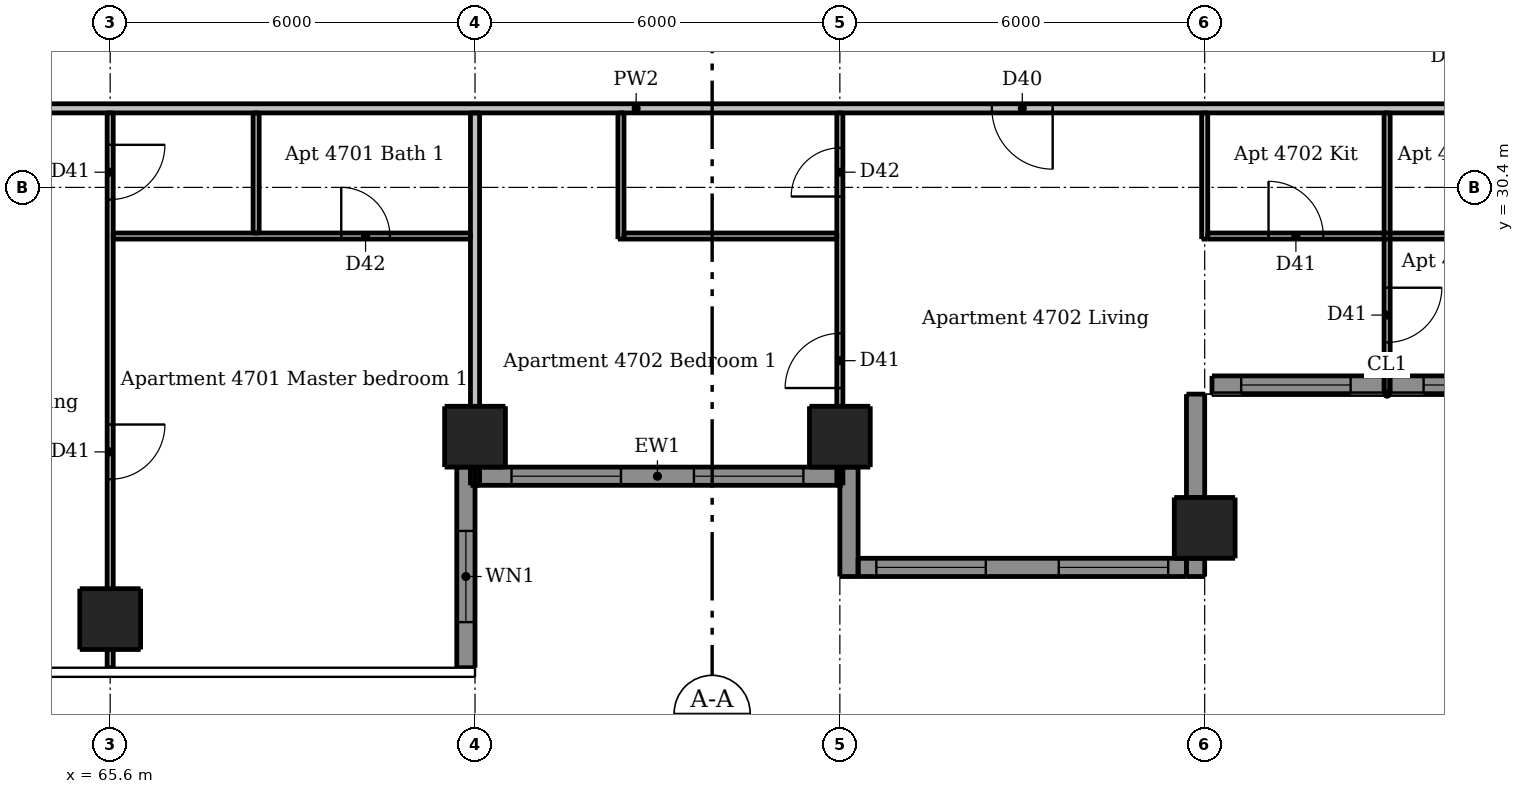
"""IFC4 building model, lengths in metres.
Left out: names, types, materials, properties, quantities, classifications, styles, units other than length and angle.
Written with IfcOpenShell. Run it as: python <this file> out.ifc"""

import sys

from ifc_helpers import new_model, si_unit, direction, frame, frame_2d, origin, origin_2d, place, context, subcontext, project, spatial, rectangle, extrude, element, fill, save


model = new_model("IFC4")
c1 = context("Model", 3, precision=1e-05, world=origin(), true_north=direction((0.0, 1.0)))
c2 = subcontext(c1, "Body", "Model", "MODEL_VIEW")
j1 = project(units=[si_unit("LENGTHUNIT", "METRE"), si_unit("PLANEANGLEUNIT", "RADIAN")], contexts=[c1])
p1 = place(None, origin())
s1 = spatial("IfcSite", under=j1, at=p1, CompositionType="ELEMENT")
p2 = place(p1, origin())
s2 = spatial("IfcBuilding", under=s1, at=p2, CompositionType="ELEMENT")
p3 = place(p2, frame((0.0, 0.0, 174.7)))
s3 = spatial("IfcBuildingStorey", under=s2, at=p3, CompositionType="ELEMENT", Elevation=174.7)
for number, where, z_axis, x_axis in (
    (1, (65.6, 23.3, 0.0), (0.0, 0.0, 1.0), (1.0, 0.0, 0.0)),
    (2, (71.6, 26.3, 0.0), (0.0, 0.0, 1.0), (1.0, 0.0, 0.0)),
    (3, (77.6, 26.3, 0.0), (0.0, 0.0, 1.0), (1.0, 0.0, 0.0)),
    (4, (83.6, 24.8, 0.0), (0.0, 0.0, 1.0), (1.0, 0.0, 0.0)),
):
    element("IfcColumn", number, at=place(p3, frame(where, z_axis=z_axis, x_axis=x_axis)), inside=s3, PredefinedType="COLUMN", context=c2, shape_type="SweptSolid", body=[
        extrude(rectangle(XDim=1.0, YDim=1.0, at=origin_2d()), origin(), (0.0, 0.0, 1.0), 2.95),
    ])
p4 = place(p3, frame((71.45, 22.5, 0.0), z_axis=(0.0, 0.0, 1.0), x_axis=(0.0, 1.0, 0.0)))
e5 = element("IfcWall", 5, at=p4, inside=s3, PredefinedType="SOLIDWALL", context=c2, shape_type="SweptSolid", body=[
    extrude(rectangle(XDim=3.3, YDim=0.3, at=frame_2d((1.65, 0.0))), origin(), (0.0, 0.0, 1.0), 2.95),
])
p5 = place(p4, frame((0.75, 0.0, 0.9)))
e6 = element("IfcOpeningElement", 6, at=p5, cuts=e5, PredefinedType="OPENING", context=c2, shape_type="SweptSolid", body=[
    extrude(rectangle(XDim=1.5, YDim=1.5, at=frame_2d((0.75, 0.75))), frame((0.0, 0.16, 0.0), z_axis=(0.0, -1.0, 0.0), x_axis=(1.0, 0.0, 0.0)), (0.0, 0.0, 1.0), 0.32),
])
p6 = place(p3, frame((77.75, 25.8, 0.0), z_axis=(0.0, 0.0, 1.0), x_axis=(0.0, -1.0, 0.0)))
e7 = element("IfcWall", 7, at=p6, inside=s3, PredefinedType="SOLIDWALL", context=c2, shape_type="SweptSolid", body=[
    extrude(rectangle(XDim=1.8, YDim=0.3, at=frame_2d((0.9, 0.0))), origin(), (0.0, 0.0, 1.0), 2.95),
])
p7 = place(p3, frame((83.45, 24.0, 0.0), z_axis=(0.0, 0.0, 1.0), x_axis=(0.0, 1.0, 0.0)))
e8 = element("IfcWall", 8, at=p7, inside=s3, PredefinedType="SOLIDWALL", context=c2, shape_type="SweptSolid", body=[
    extrude(rectangle(XDim=0.3, YDim=0.3, at=frame_2d((0.15, 0.0))), origin(), (0.0, 0.0, 1.0), 2.95),
])
p8 = place(p3, frame((83.45, 25.3, 0.0), z_axis=(0.0, 0.0, 1.0), x_axis=(0.0, 1.0, 0.0)))
e9 = element("IfcWall", 9, at=p8, inside=s3, PredefinedType="SOLIDWALL", context=c2, shape_type="SweptSolid", body=[
    extrude(rectangle(XDim=1.7, YDim=0.3, at=frame_2d((0.85, 0.0))), origin(), (0.0, 0.0, 1.0), 2.95),
])
p9 = place(p3, frame((71.6, 25.65, 0.0), z_axis=(0.0, 0.0, 1.0), x_axis=(1.0, 0.0, 0.0)))
e10 = element("IfcWall", 10, at=p9, inside=s3, PredefinedType="SOLIDWALL", context=c2, shape_type="SweptSolid", body=[
    extrude(rectangle(XDim=6.0, YDim=0.3, at=frame_2d((3.0, 0.0))), origin(), (0.0, 0.0, 1.0), 2.95),
])
p10 = place(p9, frame((0.6, 0.0, 0.15)))
e11 = element("IfcOpeningElement", 11, at=p10, cuts=e10, PredefinedType="OPENING", context=c2, shape_type="SweptSolid", body=[
    extrude(rectangle(XDim=1.8, YDim=2.1, at=frame_2d((0.9, 1.05))), frame((0.0, 0.16, 0.0), z_axis=(0.0, -1.0, 0.0), x_axis=(1.0, 0.0, 0.0)), (0.0, 0.0, 1.0), 0.32),
])
p11 = place(p9, frame((3.6, 0.0, 0.15)))
e12 = element("IfcOpeningElement", 12, at=p11, cuts=e10, PredefinedType="OPENING", context=c2, shape_type="SweptSolid", body=[
    extrude(rectangle(XDim=1.8, YDim=2.1, at=frame_2d((0.9, 1.05))), frame((0.0, 0.16, 0.0), z_axis=(0.0, -1.0, 0.0), x_axis=(1.0, 0.0, 0.0)), (0.0, 0.0, 1.0), 0.32),
])
p12 = place(p3, frame((77.9, 24.15, 0.0), z_axis=(0.0, 0.0, 1.0), x_axis=(1.0, 0.0, 0.0)))
e13 = element("IfcWall", 13, at=p12, inside=s3, PredefinedType="SOLIDWALL", context=c2, shape_type="SweptSolid", body=[
    extrude(rectangle(XDim=5.4, YDim=0.3, at=frame_2d((2.7, 0.0))), origin(), (0.0, 0.0, 1.0), 2.34),
])
p13 = place(p12, frame((0.3, 0.0, 0.15)))
e14 = element("IfcOpeningElement", 14, at=p13, cuts=e13, PredefinedType="OPENING", context=c2, shape_type="SweptSolid", body=[
    extrude(rectangle(XDim=1.8, YDim=2.1, at=frame_2d((0.9, 1.05))), frame((0.0, 0.16, 0.0), z_axis=(0.0, -1.0, 0.0), x_axis=(1.0, 0.0, 0.0)), (0.0, 0.0, 1.0), 0.32),
])
p14 = place(p12, frame((3.3, 0.0, 0.15)))
e15 = element("IfcOpeningElement", 15, at=p14, cuts=e13, PredefinedType="OPENING", context=c2, shape_type="SweptSolid", body=[
    extrude(rectangle(XDim=1.8, YDim=2.1, at=frame_2d((0.9, 1.05))), frame((0.0, 0.16, 0.0), z_axis=(0.0, -1.0, 0.0), x_axis=(1.0, 0.0, 0.0)), (0.0, 0.0, 1.0), 0.32),
])
p15 = place(p3, frame((83.72, 27.15, 0.0), z_axis=(0.0, 0.0, 1.0), x_axis=(1.0, 0.0, 0.0)))
e16 = element("IfcWall", 16, at=p15, inside=s3, PredefinedType="SOLIDWALL", context=c2, shape_type="SweptSolid", body=[
    extrude(rectangle(XDim=5.76, YDim=0.3, at=frame_2d((2.88, 0.0))), origin(), (0.0, 0.0, 1.0), 2.95),
])
p16 = place(p15, frame((0.48, 0.0, 0.15)))
e17 = element("IfcOpeningElement", 17, at=p16, cuts=e16, PredefinedType="OPENING", context=c2, shape_type="SweptSolid", body=[
    extrude(rectangle(XDim=1.8, YDim=2.1, at=frame_2d((0.9, 1.05))), frame((0.0, 0.16, 0.0), z_axis=(0.0, -1.0, 0.0), x_axis=(1.0, 0.0, 0.0)), (0.0, 0.0, 1.0), 0.32),
])
p17 = place(p15, frame((3.48, 0.0, 0.15)))
e18 = element("IfcOpeningElement", 18, at=p17, cuts=e16, PredefinedType="OPENING", context=c2, shape_type="SweptSolid", body=[
    extrude(rectangle(XDim=1.8, YDim=2.1, at=frame_2d((0.9, 1.05))), frame((0.0, 0.16, 0.0), z_axis=(0.0, -1.0, 0.0), x_axis=(1.0, 0.0, 0.0)), (0.0, 0.0, 1.0), 0.32),
])
p18 = place(p3, frame((65.6, 31.625, 0.0), z_axis=(0.0, 0.0, 1.0), x_axis=(0.0, -1.0, 0.0)))
e19 = element("IfcWall", 19, at=p18, inside=s3, PredefinedType="PARTITIONING", context=c2, shape_type="SweptSolid", body=[
    extrude(rectangle(XDim=9.125, YDim=0.1, at=frame_2d((4.562, 0.0))), origin(), (0.0, 0.0, 1.0), 2.332),
])
p19 = place(p18, frame((0.525, 0.0, 0.0)))
e20 = element("IfcOpeningElement", 20, at=p19, cuts=e19, PredefinedType="OPENING", context=c2, shape_type="SweptSolid", body=[
    extrude(rectangle(XDim=0.9, YDim=2.1, at=frame_2d((0.45, 1.05))), frame((0.0, 0.06, 0.0), z_axis=(0.0, -1.0, 0.0), x_axis=(1.0, 0.0, 0.0)), (0.0, 0.0, 1.0), 0.12),
])
p20 = place(p18, frame((5.125, 0.0, 0.0)))
e21 = element("IfcOpeningElement", 21, at=p20, cuts=e19, PredefinedType="OPENING", context=c2, shape_type="SweptSolid", body=[
    extrude(rectangle(XDim=0.9, YDim=2.1, at=frame_2d((0.45, 1.05))), frame((0.0, 0.06, 0.0), z_axis=(0.0, -1.0, 0.0), x_axis=(1.0, 0.0, 0.0)), (0.0, 0.0, 1.0), 0.12),
])
p21 = place(p3, frame((68.0, 29.65, 0.0), z_axis=(0.0, 0.0, 1.0), x_axis=(0.0, 1.0, 0.0)))
e22 = element("IfcWall", 22, at=p21, inside=s3, PredefinedType="PARTITIONING", context=c2, shape_type="SweptSolid", body=[
    extrude(rectangle(XDim=1.975, YDim=0.1, at=frame_2d((0.988, 0.0))), origin(), (0.0, 0.0, 1.0), 2.95),
])
p22 = place(p3, frame((74.0, 29.55, 0.0), z_axis=(0.0, 0.0, 1.0), x_axis=(0.0, 1.0, 0.0)))
e23 = element("IfcWall", 23, at=p22, inside=s3, PredefinedType="PARTITIONING", context=c2, shape_type="SweptSolid", body=[
    extrude(rectangle(XDim=2.075, YDim=0.1, at=frame_2d((1.038, 0.0))), origin(), (0.0, 0.0, 1.0), 2.95),
])
p23 = place(p3, frame((77.6, 25.5, 0.0), z_axis=(0.0, 0.0, 1.0), x_axis=(0.0, 1.0, 0.0)))
e24 = element("IfcWall", 24, at=p23, inside=s3, PredefinedType="PARTITIONING", context=c2, shape_type="SweptSolid", body=[
    extrude(rectangle(XDim=6.125, YDim=0.1, at=frame_2d((3.062, 0.0))), origin(), (0.0, 0.0, 1.0), 2.332),
])
p24 = place(p23, frame((1.6, 0.0, 0.0)))
e25 = element("IfcOpeningElement", 25, at=p24, cuts=e24, PredefinedType="OPENING", context=c2, shape_type="SweptSolid", body=[
    extrude(rectangle(XDim=0.9, YDim=2.1, at=frame_2d((0.45, 1.05))), frame((0.0, 0.06, 0.0), z_axis=(0.0, -1.0, 0.0), x_axis=(1.0, 0.0, 0.0)), (0.0, 0.0, 1.0), 0.12),
])
p25 = place(p23, frame((4.75, 0.0, 0.0)))
e26 = element("IfcOpeningElement", 26, at=p25, cuts=e24, PredefinedType="OPENING", context=c2, shape_type="SweptSolid", body=[
    extrude(rectangle(XDim=0.8, YDim=2.1, at=frame_2d((0.4, 1.05))), frame((0.0, 0.06, 0.0), z_axis=(0.0, -1.0, 0.0), x_axis=(1.0, 0.0, 0.0)), (0.0, 0.0, 1.0), 0.12),
])
p26 = place(p3, frame((83.6, 29.55, 0.0), z_axis=(0.0, 0.0, 1.0), x_axis=(0.0, 1.0, 0.0)))
e27 = element("IfcWall", 27, at=p26, inside=s3, PredefinedType="PARTITIONING", context=c2, shape_type="SweptSolid", body=[
    extrude(rectangle(XDim=2.075, YDim=0.1, at=frame_2d((1.038, 0.0))), origin(), (0.0, 0.0, 1.0), 2.332),
])
p27 = place(p3, frame((86.6, 31.625, 0.0), z_axis=(0.0, 0.0, 1.0), x_axis=(0.0, -1.0, 0.0)))
e28 = element("IfcWall", 28, at=p27, inside=s3, PredefinedType="PARTITIONING", context=c2, shape_type="SweptSolid", body=[
    extrude(rectangle(XDim=4.625, YDim=0.1, at=frame_2d((2.312, 0.0))), origin(), (0.0, 0.0, 1.0), 2.95),
])
p28 = place(p27, frame((2.875, 0.0, 0.0)))
e29 = element("IfcOpeningElement", 29, at=p28, cuts=e28, PredefinedType="OPENING", context=c2, shape_type="SweptSolid", body=[
    extrude(rectangle(XDim=0.9, YDim=2.1, at=frame_2d((0.45, 1.05))), frame((0.0, 0.06, 0.0), z_axis=(0.0, -1.0, 0.0), x_axis=(1.0, 0.0, 0.0)), (0.0, 0.0, 1.0), 0.12),
])
p29 = place(p3, frame((65.65, 29.6, 0.0), z_axis=(0.0, 0.0, 1.0), x_axis=(1.0, 0.0, 0.0)))
e30 = element("IfcWall", 30, at=p29, inside=s3, PredefinedType="PARTITIONING", context=c2, shape_type="SweptSolid", body=[
    extrude(rectangle(XDim=5.875, YDim=0.1, at=frame_2d((2.938, 0.0))), origin(), (0.0, 0.0, 1.0), 2.95),
])
p30 = place(p29, frame((3.75, 0.0, 0.0)))
e31 = element("IfcOpeningElement", 31, at=p30, cuts=e30, PredefinedType="OPENING", context=c2, shape_type="SweptSolid", body=[
    extrude(rectangle(XDim=0.8, YDim=2.1, at=frame_2d((0.4, 1.05))), frame((0.0, 0.06, 0.0), z_axis=(0.0, -1.0, 0.0), x_axis=(1.0, 0.0, 0.0)), (0.0, 0.0, 1.0), 0.12),
])
p31 = place(p3, frame((74.05, 29.6, 0.0), z_axis=(0.0, 0.0, 1.0), x_axis=(1.0, 0.0, 0.0)))
e32 = element("IfcWall", 32, at=p31, inside=s3, PredefinedType="PARTITIONING", context=c2, shape_type="SweptSolid", body=[
    extrude(rectangle(XDim=3.5, YDim=0.1, at=frame_2d((1.75, 0.0))), origin(), (0.0, 0.0, 1.0), 2.95),
])
p32 = place(p3, frame((83.65, 29.6, 0.0), z_axis=(0.0, 0.0, 1.0), x_axis=(1.0, 0.0, 0.0)))
e33 = element("IfcWall", 33, at=p32, inside=s3, PredefinedType="PARTITIONING", context=c2, shape_type="SweptSolid", body=[
    extrude(rectangle(XDim=5.875, YDim=0.1, at=frame_2d((2.938, 0.0))), origin(), (0.0, 0.0, 1.0), 2.95),
])
p33 = place(p32, frame((1.0, 0.0, 0.0)))
e34 = element("IfcOpeningElement", 34, at=p33, cuts=e33, PredefinedType="OPENING", context=c2, shape_type="SweptSolid", body=[
    extrude(rectangle(XDim=0.9, YDim=2.1, at=frame_2d((0.45, 1.05))), frame((0.0, 0.06, 0.0), z_axis=(0.0, -1.0, 0.0), x_axis=(1.0, 0.0, 0.0)), (0.0, 0.0, 1.0), 0.12),
])
p34 = place(p32, frame((4.05, 0.0, 0.0)))
e35 = element("IfcOpeningElement", 35, at=p34, cuts=e33, PredefinedType="OPENING", context=c2, shape_type="SweptSolid", body=[
    extrude(rectangle(XDim=0.8, YDim=2.1, at=frame_2d((0.4, 1.05))), frame((0.0, 0.06, 0.0), z_axis=(0.0, -1.0, 0.0), x_axis=(1.0, 0.0, 0.0)), (0.0, 0.0, 1.0), 0.12),
])
p35 = place(p3, frame((71.6, 25.5, 0.0), z_axis=(0.0, 0.0, 1.0), x_axis=(0.0, 1.0, 0.0)))
e36 = element("IfcWall", 36, at=p35, inside=s3, PredefinedType="PARTITIONING", context=c2, shape_type="SweptSolid", body=[
    extrude(rectangle(XDim=6.125, YDim=0.15, at=frame_2d((3.062, 0.0))), origin(), (0.0, 0.0, 1.0), 2.332),
])
p36 = place(p3, frame((89.525, 31.7, 0.0), z_axis=(0.0, 0.0, 1.0), x_axis=(-1.0, 0.0, 0.0)))
e37 = element("IfcWall", 37, at=p36, inside=s3, PredefinedType="PARTITIONING", context=c2, shape_type="SweptSolid", body=[
    extrude(rectangle(XDim=30.55, YDim=0.15, at=frame_2d((15.275, 0.0))), origin(), (0.0, 0.0, 1.0), 2.95),
])
p37 = place(p36, frame((26.775, 0.0, 0.0)))
e38 = element("IfcOpeningElement", 38, at=p37, cuts=e37, PredefinedType="OPENING", context=c2, shape_type="SweptSolid", body=[
    extrude(rectangle(XDim=1.0, YDim=2.1, at=frame_2d((0.5, 1.05))), frame((0.0, 0.085, 0.0), z_axis=(0.0, -1.0, 0.0), x_axis=(1.0, 0.0, 0.0)), (0.0, 0.0, 1.0), 0.17),
])
p38 = place(p36, frame((8.425, 0.0, 0.0)))
e39 = element("IfcOpeningElement", 39, at=p38, cuts=e37, PredefinedType="OPENING", context=c2, shape_type="SweptSolid", body=[
    extrude(rectangle(XDim=1.0, YDim=2.1, at=frame_2d((0.5, 1.05))), frame((0.0, 0.085, 0.0), z_axis=(0.0, -1.0, 0.0), x_axis=(1.0, 0.0, 0.0)), (0.0, 0.0, 1.0), 0.17),
])
p39 = place(p5, origin())
e40 = element("IfcWindow", 40, at=p39, inside=s3, PartitioningType="DOUBLE_PANEL_VERTICAL", PredefinedType="WINDOW", context=c2, shape_type="SweptSolid", body=[
    extrude(rectangle(XDim=1.5, YDim=1.5, at=frame_2d((0.75, 0.75))), frame((0.0, 0.03, 0.0), z_axis=(0.0, -1.0, 0.0), x_axis=(1.0, 0.0, 0.0)), (0.0, 0.0, 1.0), 0.06),
])
fill(e6, e40)
p40 = place(p10, origin())
e41 = element("IfcWindow", 41, at=p40, inside=s3, PartitioningType="DOUBLE_PANEL_VERTICAL", PredefinedType="WINDOW", context=c2, shape_type="SweptSolid", body=[
    extrude(rectangle(XDim=1.8, YDim=2.1, at=frame_2d((0.9, 1.05))), frame((0.0, 0.03, 0.0), z_axis=(0.0, -1.0, 0.0), x_axis=(1.0, 0.0, 0.0)), (0.0, 0.0, 1.0), 0.06),
])
fill(e11, e41)
p41 = place(p11, origin())
e42 = element("IfcWindow", 42, at=p41, inside=s3, PartitioningType="DOUBLE_PANEL_VERTICAL", PredefinedType="WINDOW", context=c2, shape_type="SweptSolid", body=[
    extrude(rectangle(XDim=1.8, YDim=2.1, at=frame_2d((0.9, 1.05))), frame((0.0, 0.03, 0.0), z_axis=(0.0, -1.0, 0.0), x_axis=(1.0, 0.0, 0.0)), (0.0, 0.0, 1.0), 0.06),
])
fill(e12, e42)
p42 = place(p13, origin())
e43 = element("IfcWindow", 43, at=p42, inside=s3, PartitioningType="DOUBLE_PANEL_VERTICAL", PredefinedType="WINDOW", context=c2, shape_type="SweptSolid", body=[
    extrude(rectangle(XDim=1.8, YDim=2.1, at=frame_2d((0.9, 1.05))), frame((0.0, 0.03, 0.0), z_axis=(0.0, -1.0, 0.0), x_axis=(1.0, 0.0, 0.0)), (0.0, 0.0, 1.0), 0.06),
])
fill(e14, e43)
p43 = place(p14, origin())
e44 = element("IfcWindow", 44, at=p43, inside=s3, PartitioningType="DOUBLE_PANEL_VERTICAL", PredefinedType="WINDOW", context=c2, shape_type="SweptSolid", body=[
    extrude(rectangle(XDim=1.8, YDim=2.1, at=frame_2d((0.9, 1.05))), frame((0.0, 0.03, 0.0), z_axis=(0.0, -1.0, 0.0), x_axis=(1.0, 0.0, 0.0)), (0.0, 0.0, 1.0), 0.06),
])
fill(e15, e44)
p44 = place(p16, origin())
e45 = element("IfcWindow", 45, at=p44, inside=s3, PartitioningType="DOUBLE_PANEL_VERTICAL", PredefinedType="WINDOW", context=c2, shape_type="SweptSolid", body=[
    extrude(rectangle(XDim=1.8, YDim=2.1, at=frame_2d((0.9, 1.05))), frame((0.0, 0.03, 0.0), z_axis=(0.0, -1.0, 0.0), x_axis=(1.0, 0.0, 0.0)), (0.0, 0.0, 1.0), 0.06),
])
fill(e17, e45)
p45 = place(p17, origin())
e46 = element("IfcWindow", 46, at=p45, inside=s3, PartitioningType="DOUBLE_PANEL_VERTICAL", PredefinedType="WINDOW", context=c2, shape_type="SweptSolid", body=[
    extrude(rectangle(XDim=1.8, YDim=2.1, at=frame_2d((0.9, 1.05))), frame((0.0, 0.03, 0.0), z_axis=(0.0, -1.0, 0.0), x_axis=(1.0, 0.0, 0.0)), (0.0, 0.0, 1.0), 0.06),
])
fill(e18, e46)
p46 = place(p19, origin())
e47 = element("IfcDoor", 47, at=p46, inside=s3, OperationType="SINGLE_SWING_LEFT", PredefinedType="DOOR", context=c2, shape_type="SweptSolid", body=[
    extrude(rectangle(XDim=0.9, YDim=2.1, at=frame_2d((0.45, 1.05))), frame((0.0, 0.025, 0.0), z_axis=(0.0, -1.0, 0.0), x_axis=(1.0, 0.0, 0.0)), (0.0, 0.0, 1.0), 0.05),
])
fill(e20, e47)
p47 = place(p20, origin())
e48 = element("IfcDoor", 48, at=p47, inside=s3, OperationType="SINGLE_SWING_LEFT", PredefinedType="DOOR", context=c2, shape_type="SweptSolid", body=[
    extrude(rectangle(XDim=0.9, YDim=2.1, at=frame_2d((0.45, 1.05))), frame((0.0, 0.025, 0.0), z_axis=(0.0, -1.0, 0.0), x_axis=(1.0, 0.0, 0.0)), (0.0, 0.0, 1.0), 0.05),
])
fill(e21, e48)
p48 = place(p30, origin())
e49 = element("IfcDoor", 49, at=p48, inside=s3, OperationType="SINGLE_SWING_LEFT", PredefinedType="DOOR", context=c2, shape_type="SweptSolid", body=[
    extrude(rectangle(XDim=0.8, YDim=2.1, at=frame_2d((0.4, 1.05))), frame((0.0, 0.025, 0.0), z_axis=(0.0, -1.0, 0.0), x_axis=(1.0, 0.0, 0.0)), (0.0, 0.0, 1.0), 0.05),
])
fill(e31, e49)
p49 = place(p38, origin())
e50 = element("IfcDoor", 50, at=p49, inside=s3, OperationType="SINGLE_SWING_LEFT", PredefinedType="DOOR", context=c2, shape_type="SweptSolid", body=[
    extrude(rectangle(XDim=1.0, YDim=2.1, at=frame_2d((0.5, 1.05))), frame((0.0, 0.025, 0.0), z_axis=(0.0, -1.0, 0.0), x_axis=(1.0, 0.0, 0.0)), (0.0, 0.0, 1.0), 0.05),
])
fill(e39, e50)
p50 = place(p33, origin())
e51 = element("IfcDoor", 51, at=p50, inside=s3, OperationType="SINGLE_SWING_LEFT", PredefinedType="DOOR", context=c2, shape_type="SweptSolid", body=[
    extrude(rectangle(XDim=0.9, YDim=2.1, at=frame_2d((0.45, 1.05))), frame((0.0, 0.025, 0.0), z_axis=(0.0, -1.0, 0.0), x_axis=(1.0, 0.0, 0.0)), (0.0, 0.0, 1.0), 0.05),
])
fill(e34, e51)
p51 = place(p24, origin())
e52 = element("IfcDoor", 52, at=p51, inside=s3, OperationType="SINGLE_SWING_LEFT", PredefinedType="DOOR", context=c2, shape_type="SweptSolid", body=[
    extrude(rectangle(XDim=0.9, YDim=2.1, at=frame_2d((0.45, 1.05))), frame((0.0, 0.025, 0.0), z_axis=(0.0, -1.0, 0.0), x_axis=(1.0, 0.0, 0.0)), (0.0, 0.0, 1.0), 0.05),
])
fill(e25, e52)
p52 = place(p25, origin())
e53 = element("IfcDoor", 53, at=p52, inside=s3, OperationType="SINGLE_SWING_LEFT", PredefinedType="DOOR", context=c2, shape_type="SweptSolid", body=[
    extrude(rectangle(XDim=0.8, YDim=2.1, at=frame_2d((0.4, 1.05))), frame((0.0, 0.025, 0.0), z_axis=(0.0, -1.0, 0.0), x_axis=(1.0, 0.0, 0.0)), (0.0, 0.0, 1.0), 0.05),
])
fill(e26, e53)
p53 = place(p28, origin())
e54 = element("IfcDoor", 54, at=p53, inside=s3, OperationType="SINGLE_SWING_LEFT", PredefinedType="DOOR", context=c2, shape_type="SweptSolid", body=[
    extrude(rectangle(XDim=0.9, YDim=2.1, at=frame_2d((0.45, 1.05))), frame((0.0, 0.025, 0.0), z_axis=(0.0, -1.0, 0.0), x_axis=(1.0, 0.0, 0.0)), (0.0, 0.0, 1.0), 0.05),
])
fill(e29, e54)
save(model, sys.argv[1])
